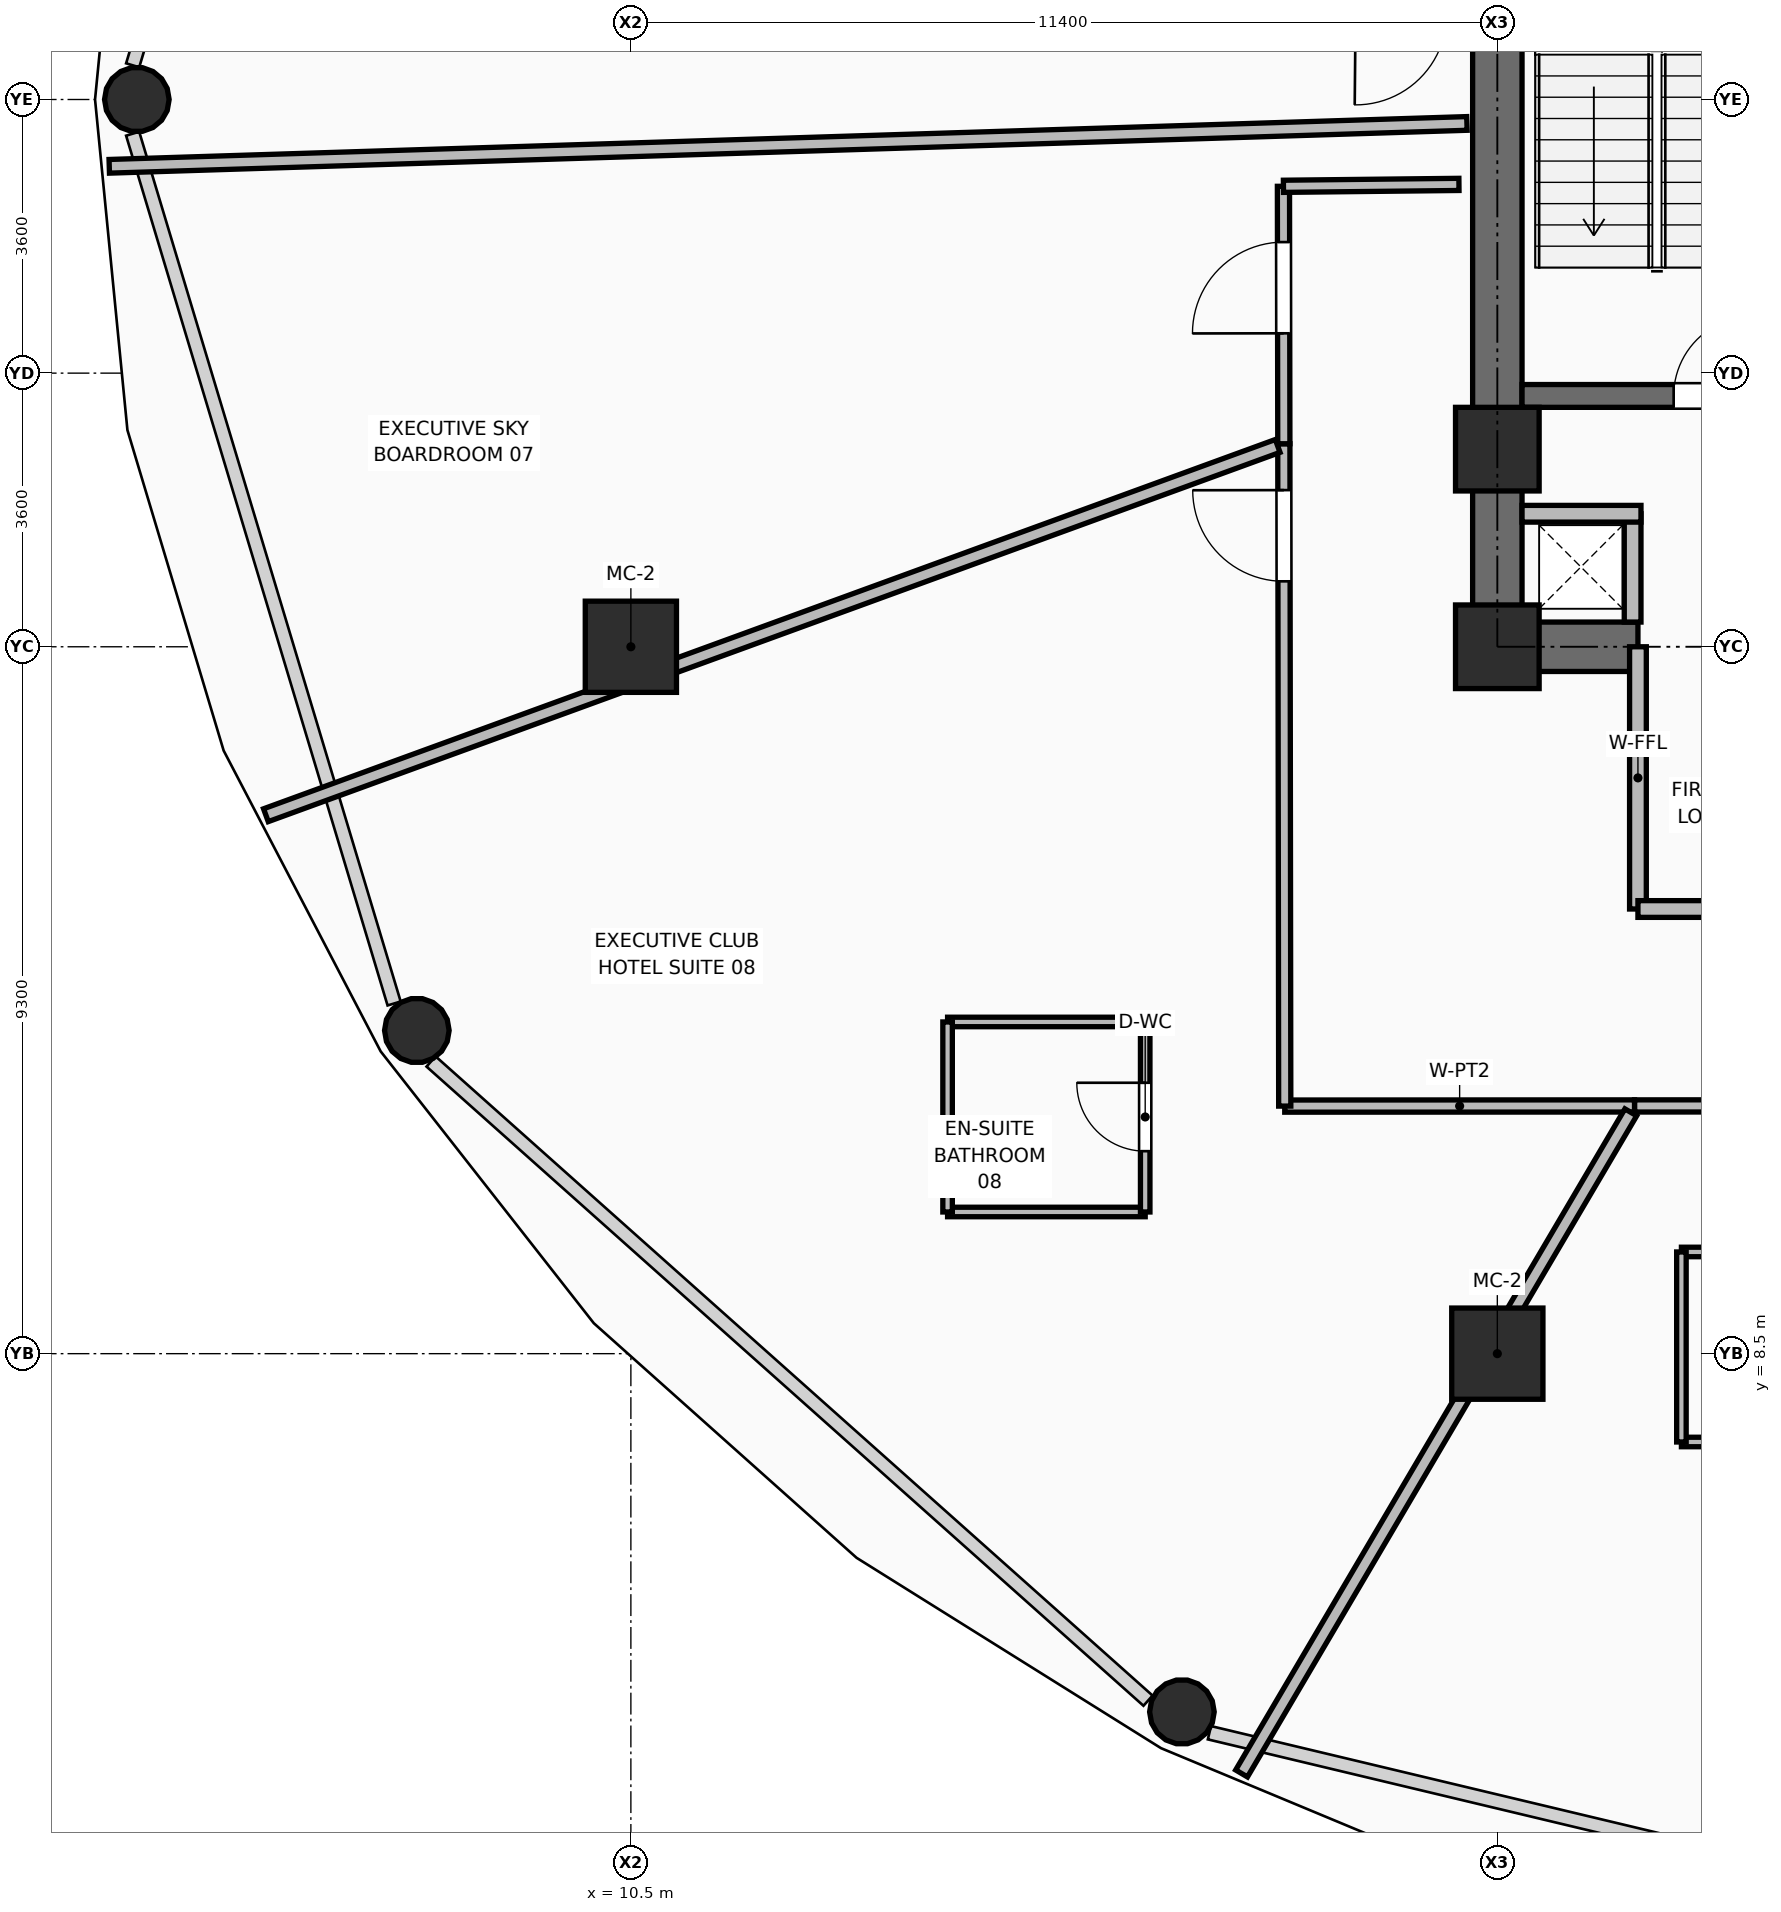
"""IFC4 building model, lengths in metres.
Left out: names, types, materials, properties, quantities, classifications, styles, units other than length and angle.
Written with IfcOpenShell. Run it as: python <this file> out.ifc"""

import sys

from ifc_helpers import new_model, si_unit, direction, frame, frame_2d, origin, origin_2d, place, context, subcontext, project, spatial, rectangle, hollow_rectangle, hollow_circle, extrude, element, fill, save


model = new_model("IFC4")
c1 = context("Model", 3, precision=1e-05, world=origin(), true_north=direction((0.0, 1.0)))
c2 = subcontext(c1, "Body", "Model", "MODEL_VIEW")
j1 = project(units=[si_unit("LENGTHUNIT", "METRE"), si_unit("PLANEANGLEUNIT", "RADIAN")], contexts=[c1])
p1 = place(None, origin())
s1 = spatial("IfcSite", under=j1, at=p1, CompositionType="ELEMENT")
p2 = place(p1, origin())
s2 = spatial("IfcBuilding", under=s1, at=p2, CompositionType="ELEMENT")
p3 = place(p2, frame((0.0, 0.0, 87.0)))
s3 = spatial("IfcBuildingStorey", under=s2, at=p3, CompositionType="ELEMENT", Elevation=87.0)
for number, where, z_axis, x_axis in (
    (1, (21.9, 17.8, 0.0), (0.0, 0.0, 1.0), (1.0, 0.0, 0.0)),
    (2, (21.9, 20.4, 0.0), (0.0, 0.0, 1.0), (1.0, 0.0, 0.0)),
):
    element("IfcColumn", number, at=place(p3, frame(where, z_axis=z_axis, x_axis=x_axis)), inside=s3, PredefinedType="COLUMN", context=c2, shape_type="SweptSolid", body=[
        extrude(rectangle(XDim=1.1, YDim=1.1, at=origin_2d()), origin(), (0.0, 0.0, 1.0), 3.75),
    ])
for number, where, z_axis, x_axis in (
    (3, (21.9, 8.5, 0.0), (0.0, 0.0, 1.0), (1.0, 0.0, 0.0)),
    (4, (10.5, 17.8, 0.0), (0.0, 0.0, 1.0), (1.0, 0.0, 0.0)),
):
    element("IfcColumn", number, at=place(p3, frame(where, z_axis=z_axis, x_axis=x_axis)), inside=s3, PredefinedType="COLUMN", context=c2, shape_type="SweptSolid", body=[
        extrude(hollow_rectangle(XDim=1.2, YDim=1.2, WallThickness=0.045, at=origin_2d()), origin(), (0.0, 0.0, 1.0), 3.75),
    ])
p4 = place(p3, frame((4.0, 25.0, 0.0), z_axis=(0.127508130523, 0.0, 0.991837525329), x_axis=(0.0, 1.0, 0.0)))
e5 = element("IfcColumn", 5, at=p4, inside=s3, PredefinedType="COLUMN", context=c2, shape_type="SweptSolid", body=[
    extrude(hollow_circle(Radius=0.425, WallThickness=0.04, at=origin_2d()), origin(), (0.0, 0.0, 1.0), 3.529),
])
p5 = place(p3, frame((7.684, 12.752, 0.0), z_axis=(0.110533289521, 0.056962365232, 0.992238721707), x_axis=(-0.458089880056, 0.888905879039, 0.0)))
e6 = element("IfcColumn", 6, at=p5, inside=s3, PredefinedType="COLUMN", context=c2, shape_type="SweptSolid", body=[
    extrude(hollow_circle(Radius=0.425, WallThickness=0.04, at=origin_2d()), origin(), (0.0, 0.0, 1.0), 3.527),
])
p6 = place(p3, frame((17.75, 3.787, 0.0), z_axis=(0.063867569811, 0.098710723407, 0.993064512814), x_axis=(-0.839585964149, 0.543226848383, 0.0)))
e7 = element("IfcColumn", 7, at=p6, inside=s3, PredefinedType="COLUMN", context=c2, shape_type="SweptSolid", body=[
    extrude(hollow_circle(Radius=0.425, WallThickness=0.04, at=origin_2d()), origin(), (0.0, 0.0, 1.0), 3.524),
])
p7 = place(p3, frame((21.575, 17.8, 0.0), z_axis=(0.0, 0.0, 1.0), x_axis=(1.0, 0.0, 0.0)))
e8 = element("IfcWall", 8, at=p7, inside=s3, PredefinedType="SHEAR", context=c2, shape_type="SweptSolid", body=[
    extrude(rectangle(XDim=2.175, YDim=0.65, at=frame_2d((1.087, 0.0))), origin(), (0.0, 0.0, 1.0), 3.5),
])
p8 = place(p3, frame((21.9, 18.125, 0.0), z_axis=(0.0, 0.0, 1.0), x_axis=(0.0, 1.0, 0.0)))
e9 = element("IfcWall", 9, at=p8, inside=s3, PredefinedType="SHEAR", context=c2, shape_type="SweptSolid", body=[
    extrude(rectangle(XDim=14.0, YDim=0.65, at=frame_2d((7.0, 0.0))), origin(), (0.0, 0.0, 1.0), 3.5),
])
p9 = place(p3, frame((22.225, 21.1, 0.0), z_axis=(0.0, 0.0, 1.0), x_axis=(1.0, 0.0, 0.0)))
e10 = element("IfcWall", 10, at=p9, inside=s3, PredefinedType="SHEAR", context=c2, shape_type="SweptSolid", body=[
    extrude(rectangle(XDim=3.515, YDim=0.3, at=frame_2d((1.757, 0.0))), origin(), (0.0, 0.0, 1.0), 3.5),
])
p10 = place(p9, frame((1.995, 0.0, 0.0)))
e11 = element("IfcOpeningElement", 11, at=p10, cuts=e10, PredefinedType="OPENING", context=c2, shape_type="SweptSolid", body=[
    extrude(rectangle(XDim=1.05, YDim=2.1, at=frame_2d((0.525, 1.05))), frame((0.0, 0.16, 0.0), z_axis=(0.0, -1.0, 0.0), x_axis=(1.0, 0.0, 0.0)), (0.0, 0.0, 1.0), 0.32),
])
p11 = place(p3, frame((23.68, 18.125, 0.0), z_axis=(0.0, 0.0, 1.0), x_axis=(0.0, 1.0, 0.0)))
e12 = element("IfcWall", 12, at=p11, inside=s3, PredefinedType="PARTITIONING", context=c2, shape_type="SweptSolid", body=[
    extrude(rectangle(XDim=1.425, YDim=0.22, at=frame_2d((0.712, 0.0))), origin(), (0.0, 0.0, 1.0), 3.48),
])
p12 = place(p3, frame((22.225, 19.55, 0.0), z_axis=(0.0, 0.0, 1.0), x_axis=(1.0, 0.0, 0.0)))
e13 = element("IfcWall", 13, at=p12, inside=s3, PredefinedType="PARTITIONING", context=c2, shape_type="SweptSolid", body=[
    extrude(rectangle(XDim=1.565, YDim=0.22, at=frame_2d((0.782, 0.0))), origin(), (0.0, 0.0, 1.0), 2.525),
])
p13 = place(p3, frame((23.75, 14.35, 0.0), z_axis=(0.0, 0.0, 1.0), x_axis=(0.0, 1.0, 0.0)))
e14 = element("IfcWall", 14, at=p13, inside=s3, PredefinedType="PARTITIONING", context=c2, shape_type="SweptSolid", body=[
    extrude(rectangle(XDim=3.45, YDim=0.22, at=frame_2d((1.725, 0.0))), origin(), (0.0, 0.0, 1.0), 2.858),
])
p14 = place(p3, frame((23.75, 14.35, 0.0), z_axis=(0.0, 0.0, 1.0), x_axis=(1.0, 0.0, 0.0)))
e15 = element("IfcWall", 15, at=p14, inside=s3, PredefinedType="PARTITIONING", context=c2, shape_type="SweptSolid", body=[
    extrude(rectangle(XDim=3.8, YDim=0.22, at=frame_2d((1.9, 0.0))), origin(), (0.0, 0.0, 1.0), 3.48),
])
p15 = place(p3, frame((34.615, 11.764, 0.0), z_axis=(0.0, 0.0, 1.0), x_axis=(-0.999999899846, -0.00044755741, 0.0)))
e16 = element("IfcWall", 16, at=p15, inside=s3, PredefinedType="PARTITIONING", context=c2, shape_type="SweptSolid", body=[
    extrude(rectangle(XDim=10.91, YDim=0.16, at=frame_2d((5.455, 0.0))), origin(), (0.0, 0.0, 1.0), 2.858),
])
p16 = place(p15, frame((4.78, 0.0, 0.0)))
e17 = element("IfcOpeningElement", 17, at=p16, cuts=e16, PredefinedType="OPENING", context=c2, shape_type="SweptSolid", body=[
    extrude(rectangle(XDim=1.2, YDim=2.1, at=frame_2d((0.6, 1.05))), frame((0.0, 0.09, 0.0), z_axis=(0.0, -1.0, 0.0), x_axis=(1.0, 0.0, 0.0)), (0.0, 0.0, 1.0), 0.18),
])
p17 = place(p3, frame((23.705, 11.759, 0.0), z_axis=(0.0, 0.0, 1.0), x_axis=(-0.999999909941, -0.000424403145, 0.0)))
e18 = element("IfcWall", 18, at=p17, inside=s3, PredefinedType="PARTITIONING", context=c2, shape_type="SweptSolid", body=[
    extrude(rectangle(XDim=4.602, YDim=0.16, at=frame_2d((2.301, 0.0))), origin(), (0.0, 0.0, 1.0), 2.858),
])
p18 = place(p3, frame((19.103, 11.757, 0.0), z_axis=(0.0, 0.0, 1.0), x_axis=(-0.001372855369, 0.999999057634, 0.0)))
e19 = element("IfcWall", 19, at=p18, inside=s3, PredefinedType="PARTITIONING", context=c2, shape_type="SweptSolid", body=[
    extrude(rectangle(XDim=8.714, YDim=0.16, at=frame_2d((4.357, 0.0))), origin(), (0.0, 0.0, 1.0), 2.858),
])
p19 = place(p18, frame((6.904, 0.0, 0.0)))
e20 = element("IfcOpeningElement", 20, at=p19, cuts=e19, PredefinedType="OPENING", context=c2, shape_type="SweptSolid", body=[
    extrude(rectangle(XDim=1.2, YDim=2.1, at=frame_2d((0.6, 1.05))), frame((0.0, 0.09, 0.0), z_axis=(0.0, -1.0, 0.0), x_axis=(1.0, 0.0, 0.0)), (0.0, 0.0, 1.0), 0.18),
])
p20 = place(p3, frame((19.091, 20.471, 0.0), z_axis=(0.0, 0.0, 1.0), x_axis=(-0.001513729975, 0.99999885431, 0.0)))
e21 = element("IfcWall", 21, at=p20, inside=s3, PredefinedType="PARTITIONING", context=c2, shape_type="SweptSolid", body=[
    extrude(rectangle(XDim=3.387, YDim=0.16, at=frame_2d((1.693, 0.0))), origin(), (0.0, 0.0, 1.0), 2.858),
])
p21 = place(p20, frame((1.453, 0.0, 0.0)))
e22 = element("IfcOpeningElement", 22, at=p21, cuts=e21, PredefinedType="OPENING", context=c2, shape_type="SweptSolid", body=[
    extrude(rectangle(XDim=1.2, YDim=2.1, at=frame_2d((0.6, 1.05))), frame((0.0, 0.09, 0.0), z_axis=(0.0, -1.0, 0.0), x_axis=(1.0, 0.0, 0.0)), (0.0, 0.0, 1.0), 0.18),
])
p22 = place(p3, frame((19.086, 23.858, 0.0), z_axis=(0.0, 0.0, 1.0), x_axis=(0.999940706484, 0.010889605918, 0.0)))
e23 = element("IfcWall", 23, at=p22, inside=s3, PredefinedType="PARTITIONING", context=c2, shape_type="SweptSolid", body=[
    extrude(rectangle(XDim=2.309, YDim=0.16, at=frame_2d((1.155, 0.0))), origin(), (0.0, 0.0, 1.0), 3.48),
])
p23 = place(p3, frame((21.5, 24.685, 0.0), z_axis=(0.0, 0.0, 1.0), x_axis=(-0.999501988986, -0.031555887143, 0.0)))
e24 = element("IfcWall", 24, at=p23, inside=s3, PredefinedType="PARTITIONING", context=c2, shape_type="SweptSolid", body=[
    extrude(rectangle(XDim=17.872, YDim=0.18, at=frame_2d((8.936, 0.0))), origin(), (0.0, 0.0, 1.0), 2.525),
])
p24 = place(p3, frame((19.01, 20.442, 0.0), z_axis=(0.0, 0.0, 1.0), x_axis=(-0.93940347369, -0.342813526015, 0.0)))
e25 = element("IfcWall", 25, at=p24, inside=s3, PredefinedType="PARTITIONING", context=c2, shape_type="SweptSolid", body=[
    extrude(rectangle(XDim=14.171, YDim=0.18, at=frame_2d((7.085, 0.0))), origin(), (0.0, 0.0, 1.0), 2.705),
])
p25 = place(p3, frame((23.656, 11.675, 0.0), z_axis=(0.0, 0.0, 1.0), x_axis=(-0.507360455352, -0.861733931295, 0.0)))
e26 = element("IfcWall", 26, at=p25, inside=s3, PredefinedType="PARTITIONING", context=c2, shape_type="SweptSolid", body=[
    extrude(rectangle(XDim=10.094, YDim=0.18, at=frame_2d((5.047, 0.0))), origin(), (0.0, 0.0, 1.0), 2.705),
])
for number, where, z_axis, x_axis in (
    (27, (14.667, 10.364, 0.0), (0.0, 0.0, 1.0), (1.0, 0.0, 0.0)),
    (28, (14.667, 12.864, 0.0), (0.0, 0.0, 1.0), (1.0, 0.0, 0.0)),
):
    element("IfcWall", number, at=place(p3, frame(where, z_axis=z_axis, x_axis=x_axis)), inside=s3, PredefinedType="PARTITIONING", context=c2, shape_type="SweptSolid", body=[
        extrude(rectangle(XDim=2.6, YDim=0.125, at=frame_2d((1.3, 0.0))), origin(), (0.0, 0.0, 1.0), 3.48),
    ])
p26 = place(p3, frame((14.667, 10.364, 0.0), z_axis=(0.0, 0.0, 1.0), x_axis=(0.0, 1.0, 0.0)))
e29 = element("IfcWall", 29, at=p26, inside=s3, PredefinedType="PARTITIONING", context=c2, shape_type="SweptSolid", body=[
    extrude(rectangle(XDim=2.5, YDim=0.125, at=frame_2d((1.25, 0.0))), origin(), (0.0, 0.0, 1.0), 3.48),
])
p27 = place(p3, frame((17.267, 10.364, 0.0), z_axis=(0.0, 0.0, 1.0), x_axis=(0.0, 1.0, 0.0)))
e30 = element("IfcWall", 30, at=p27, inside=s3, PredefinedType="PARTITIONING", context=c2, shape_type="SweptSolid", body=[
    extrude(rectangle(XDim=2.5, YDim=0.125, at=frame_2d((1.25, 0.0))), origin(), (0.0, 0.0, 1.0), 3.48),
])
p28 = place(p27, frame((0.8, 0.0, 0.0)))
e31 = element("IfcOpeningElement", 31, at=p28, cuts=e30, PredefinedType="OPENING", context=c2, shape_type="SweptSolid", body=[
    extrude(rectangle(XDim=0.9, YDim=2.1, at=frame_2d((0.45, 1.05))), frame((0.0, 0.073, 0.0), z_axis=(0.0, -1.0, 0.0), x_axis=(1.0, 0.0, 0.0)), (0.0, 0.0, 1.0), 0.145),
])
p29 = place(p3, frame((24.322, 7.338, 0.0), z_axis=(0.0, 0.0, 1.0), x_axis=(1.0, 0.0, 0.0)))
e32 = element("IfcWall", 32, at=p29, inside=s3, PredefinedType="PARTITIONING", context=c2, shape_type="SweptSolid", body=[
    extrude(rectangle(XDim=2.6, YDim=0.125, at=frame_2d((1.3, 0.0))), origin(), (0.0, 0.0, 1.0), 3.48),
])
p30 = place(p3, frame((24.322, 9.838, 0.0), z_axis=(0.0, 0.0, 1.0), x_axis=(1.0, 0.0, 0.0)))
e33 = element("IfcWall", 33, at=p30, inside=s3, PredefinedType="PARTITIONING", context=c2, shape_type="SweptSolid", body=[
    extrude(rectangle(XDim=2.6, YDim=0.125, at=frame_2d((1.3, 0.0))), origin(), (0.0, 0.0, 1.0), 3.48),
])
p31 = place(p30, frame((0.85, 0.0, 0.0)))
e34 = element("IfcOpeningElement", 34, at=p31, cuts=e33, PredefinedType="OPENING", context=c2, shape_type="SweptSolid", body=[
    extrude(rectangle(XDim=0.9, YDim=2.1, at=frame_2d((0.45, 1.05))), frame((0.0, 0.073, 0.0), z_axis=(0.0, -1.0, 0.0), x_axis=(1.0, 0.0, 0.0)), (0.0, 0.0, 1.0), 0.145),
])
p32 = place(p3, frame((24.322, 7.338, 0.0), z_axis=(0.0, 0.0, 1.0), x_axis=(0.0, 1.0, 0.0)))
e35 = element("IfcWall", 35, at=p32, inside=s3, PredefinedType="PARTITIONING", context=c2, shape_type="SweptSolid", body=[
    extrude(rectangle(XDim=2.5, YDim=0.125, at=frame_2d((1.25, 0.0))), origin(), (0.0, 0.0, 1.0), 3.48),
])
p33 = place(p10, origin())
e36 = element("IfcDoor", 36, at=p33, inside=s3, OperationType="SINGLE_SWING_RIGHT", PredefinedType="DOOR", context=c2, shape_type="SweptSolid", body=[
    extrude(rectangle(XDim=1.05, YDim=2.1, at=frame_2d((0.525, 1.05))), frame((0.0, 0.025, 0.0), z_axis=(0.0, -1.0, 0.0), x_axis=(1.0, 0.0, 0.0)), (0.0, 0.0, 1.0), 0.05),
])
fill(e11, e36)
p34 = place(p21, origin())
e37 = element("IfcDoor", 37, at=p34, inside=s3, OperationType="SINGLE_SWING_LEFT", PredefinedType="DOOR", context=c2, shape_type="SweptSolid", body=[
    extrude(rectangle(XDim=1.2, YDim=2.1, at=frame_2d((0.6, 1.05))), frame((0.0, 0.025, 0.0), z_axis=(0.0, -1.0, 0.0), x_axis=(1.0, 0.0, 0.0)), (0.0, 0.0, 1.0), 0.05),
])
fill(e22, e37)
p35 = place(p28, origin())
e38 = element("IfcDoor", 38, at=p35, inside=s3, OperationType="SINGLE_SWING_RIGHT", PredefinedType="DOOR", context=c2, shape_type="SweptSolid", body=[
    extrude(rectangle(XDim=0.9, YDim=2.1, at=frame_2d((0.45, 1.05))), frame((0.0, 0.025, 0.0), z_axis=(0.0, -1.0, 0.0), x_axis=(1.0, 0.0, 0.0)), (0.0, 0.0, 1.0), 0.05),
])
fill(e31, e38)
p36 = place(p19, origin())
e39 = element("IfcDoor", 39, at=p36, inside=s3, OperationType="SINGLE_SWING_RIGHT", PredefinedType="DOOR", context=c2, shape_type="SweptSolid", body=[
    extrude(rectangle(XDim=1.2, YDim=2.1, at=frame_2d((0.6, 1.05))), frame((0.0, 0.025, 0.0), z_axis=(0.0, -1.0, 0.0), x_axis=(1.0, 0.0, 0.0)), (0.0, 0.0, 1.0), 0.05),
])
fill(e20, e39)
save(model, sys.argv[1])
